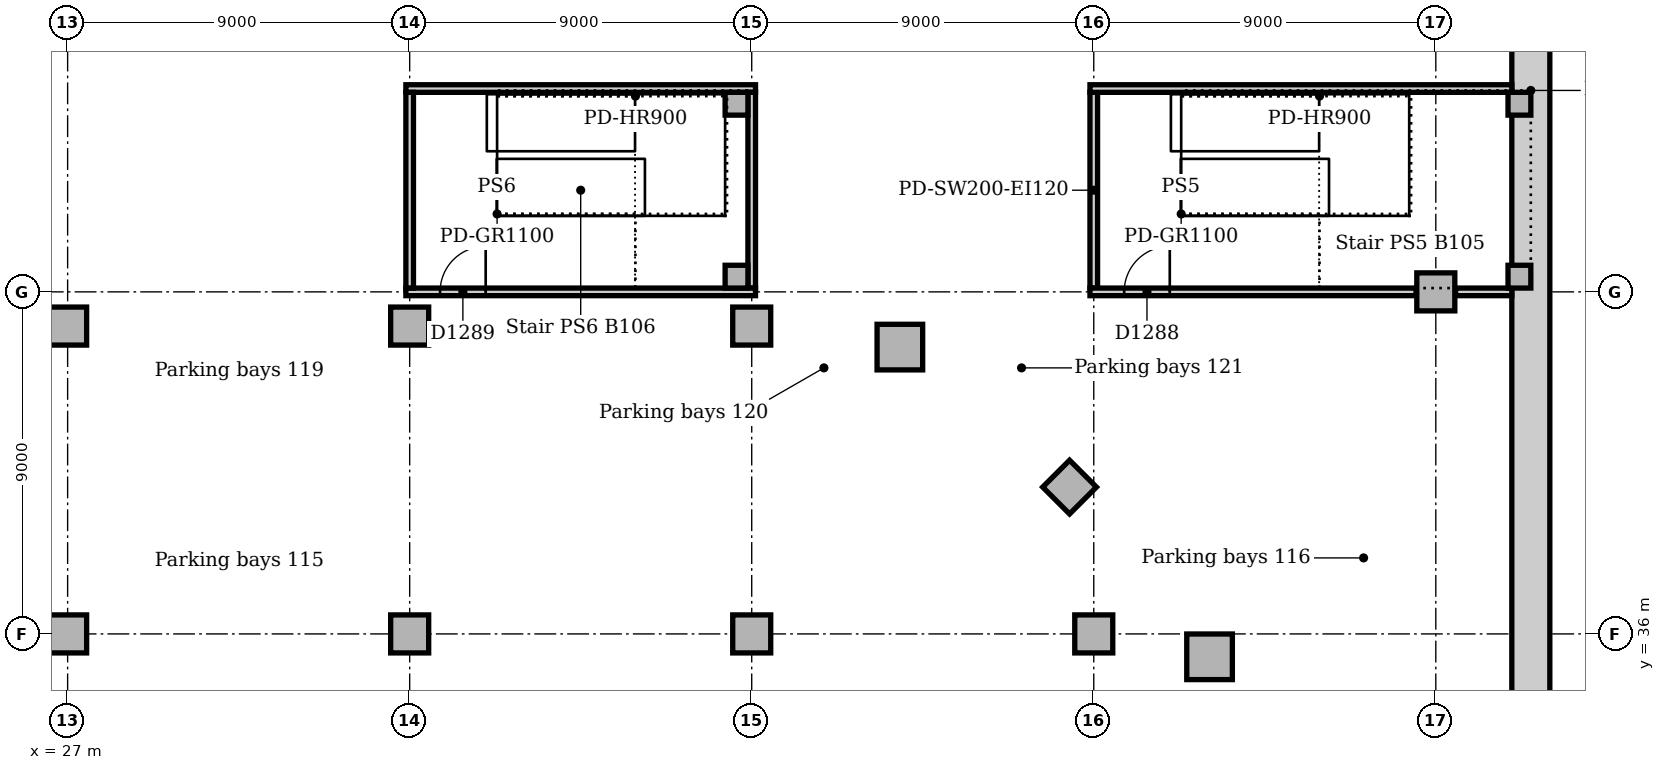
"""IFC4 building model, lengths in metres.
Left out: names, types, materials, properties, quantities, classifications, styles, units other than length and angle.
Written with IfcOpenShell. Run it as: python <this file> out.ifc"""

import sys

from ifc_helpers import new_model, si_unit, direction, frame, frame_2d, origin, origin_2d, place, context, subcontext, project, spatial, rectangle, extrude, element, fill, save


model = new_model("IFC4")
c1 = context("Model", 3, precision=1e-05, world=origin(), true_north=direction((0.0, 1.0)))
c2 = subcontext(c1, "Body", "Model", "MODEL_VIEW")
j1 = project(units=[si_unit("LENGTHUNIT", "METRE"), si_unit("PLANEANGLEUNIT", "RADIAN")], contexts=[c1])
p1 = place(None, origin())
s1 = spatial("IfcSite", under=j1, at=p1, CompositionType="ELEMENT")
p2 = place(p1, origin())
s2 = spatial("IfcBuilding", under=s1, at=p2, CompositionType="ELEMENT")
p3 = place(p2, frame((0.0, 0.0, -5.0)))
s3 = spatial("IfcBuildingStorey", under=s2, at=p3, CompositionType="ELEMENT", Elevation=-5.0)
for number, where, z_axis, x_axis in (
    (1, (57.047, 35.398, 0.0), (0.0, 0.0, 1.0), (1.0, 0.0, 0.0)),
    (2, (48.898, 43.547, 0.0), (0.0, 0.0, 1.0), (1.0, 0.0, 0.0)),
):
    element("IfcColumn", number, at=place(p3, frame(where, z_axis=z_axis, x_axis=x_axis)), inside=s3, PredefinedType="COLUMN", context=c2, shape_type="SweptSolid", body=[
        extrude(rectangle(XDim=1.2, YDim=1.2, at=origin_2d()), origin(), (0.0, 0.0, 1.0), 4.7),
    ])
for number, where, z_axis, x_axis in (
    (3, (53.364, 39.864, 0.0), (0.0, 0.0, 1.0), (0.707, 0.707, 0.0)),
    (4, (27.0, 44.1, 0.0), (0.0, 0.0, 1.0), (1.0, 0.0, 0.0)),
    (5, (36.0, 44.1, 0.0), (0.0, 0.0, 1.0), (1.0, 0.0, 0.0)),
    (6, (45.0, 44.1, 0.0), (0.0, 0.0, 1.0), (1.0, 0.0, 0.0)),
    (7, (27.0, 36.0, 0.0), (0.0, 0.0, 1.0), (1.0, 0.0, 0.0)),
    (8, (36.0, 36.0, 0.0), (0.0, 0.0, 1.0), (1.0, 0.0, 0.0)),
    (9, (45.0, 36.0, 0.0), (0.0, 0.0, 1.0), (1.0, 0.0, 0.0)),
    (10, (54.0, 36.0, 0.0), (0.0, 0.0, 1.0), (1.0, 0.0, 0.0)),
):
    element("IfcColumn", number, at=place(p3, frame(where, z_axis=z_axis, x_axis=x_axis)), inside=s3, PredefinedType="COLUMN", context=c2, shape_type="SweptSolid", body=[
        extrude(rectangle(XDim=1.0, YDim=1.0, at=origin_2d()), origin(), (0.0, 0.0, 1.0), 4.7),
    ])
p4 = place(p3, frame((65.5, 53.641, 0.0), z_axis=(0.0, 0.0, 1.0), x_axis=(0.0, -1.0, 0.0)))
e11 = element("IfcWall", 11, at=p4, inside=s3, PredefinedType="SOLIDWALL", context=c2, shape_type="SweptSolid", body=[
    extrude(rectangle(XDim=62.282, YDim=1.0, at=frame_2d((31.141, 0.0))), origin(), (0.0, 0.0, 1.0), 4.7),
])
p5 = place(p3, frame((63.0, 45.0, 0.0), z_axis=(0.0, 0.0, 1.0), x_axis=(1.0, 0.0, 0.0)))
e12 = element("IfcColumn", 12, at=p5, inside=s3, PredefinedType="COLUMN", context=c2, shape_type="SweptSolid", body=[
    extrude(rectangle(XDim=1.0, YDim=1.0, at=origin_2d()), origin(), (0.0, 0.0, 1.0), 4.7),
])
for number, where, z_axis, x_axis in (
    (13, (65.2, 49.95, 0.0), (0.0, 0.0, 1.0), (1.0, 0.0, 0.0)),
    (14, (65.2, 45.4, 0.0), (0.0, 0.0, 1.0), (1.0, 0.0, 0.0)),
    (15, (44.6, 49.95, 0.0), (0.0, 0.0, 1.0), (1.0, 0.0, 0.0)),
    (16, (44.6, 45.4, 0.0), (0.0, 0.0, 1.0), (1.0, 0.0, 0.0)),
):
    element("IfcColumn", number, at=place(p3, frame(where, z_axis=z_axis, x_axis=x_axis)), inside=s3, PredefinedType="COLUMN", context=c2, shape_type="SweptSolid", body=[
        extrude(rectangle(XDim=0.6, YDim=0.6, at=origin_2d()), origin(), (0.0, 0.0, 1.0), 5.0),
    ])
p6 = place(p3, frame((54.0, 45.1, 0.0), z_axis=(0.0, 0.0, 1.0), x_axis=(0.0, 1.0, 0.0)))
e17 = element("IfcWall", 17, at=p6, inside=s3, PredefinedType="SOLIDWALL", context=c2, shape_type="SweptSolid", body=[
    extrude(rectangle(XDim=5.15, YDim=0.2, at=frame_2d((2.575, 0.0))), origin(), (0.0, 0.0, 1.0), 4.7),
])
p7 = place(p3, frame((53.9, 50.35, 0.0), z_axis=(0.0, 0.0, 1.0), x_axis=(1.0, 0.0, 0.0)))
e18 = element("IfcWall", 18, at=p7, inside=s3, PredefinedType="SOLIDWALL", context=c2, shape_type="SweptSolid", body=[
    extrude(rectangle(XDim=11.1, YDim=0.2, at=frame_2d((5.55, 0.0))), origin(), (0.0, 0.0, 1.0), 4.7),
])
p8 = place(p3, frame((53.9, 45.0, 0.0), z_axis=(0.0, 0.0, 1.0), x_axis=(1.0, 0.0, 0.0)))
e19 = element("IfcWall", 19, at=p8, inside=s3, PredefinedType="SOLIDWALL", context=c2, shape_type="SweptSolid", body=[
    extrude(rectangle(XDim=8.58, YDim=0.2, at=frame_2d((4.29, 0.0))), origin(), (0.0, 0.0, 1.0), 4.7),
])
p9 = place(p8, frame((0.9, 0.0, 0.0)))
e20 = element("IfcOpeningElement", 20, at=p9, cuts=e19, PredefinedType="OPENING", context=c2, shape_type="SweptSolid", body=[
    extrude(rectangle(XDim=1.2, YDim=2.1, at=frame_2d((0.6, 1.05))), frame((0.0, 0.11, 0.0), z_axis=(0.0, -1.0, 0.0), x_axis=(1.0, 0.0, 0.0)), (0.0, 0.0, 1.0), 0.22),
])
p10 = place(p3, frame((63.52, 45.0, 0.0), z_axis=(0.0, 0.0, 1.0), x_axis=(1.0, 0.0, 0.0)))
e21 = element("IfcWall", 21, at=p10, inside=s3, PredefinedType="SOLIDWALL", context=c2, shape_type="SweptSolid", body=[
    extrude(rectangle(XDim=1.48, YDim=0.2, at=frame_2d((0.74, 0.0))), origin(), (0.0, 0.0, 1.0), 4.7),
])
p11 = place(p3, frame((35.9, 50.35, 0.0), z_axis=(0.0, 0.0, 1.0), x_axis=(1.0, 0.0, 0.0)))
e22 = element("IfcWall", 22, at=p11, inside=s3, PredefinedType="SOLIDWALL", context=c2, shape_type="SweptSolid", body=[
    extrude(rectangle(XDim=9.2, YDim=0.2, at=frame_2d((4.6, 0.0))), origin(), (0.0, 0.0, 1.0), 4.7),
])
p12 = place(p3, frame((45.0, 45.1, 0.0), z_axis=(0.0, 0.0, 1.0), x_axis=(0.0, 1.0, 0.0)))
e23 = element("IfcWall", 23, at=p12, inside=s3, PredefinedType="SOLIDWALL", context=c2, shape_type="SweptSolid", body=[
    extrude(rectangle(XDim=5.15, YDim=0.2, at=frame_2d((2.575, 0.0))), origin(), (0.0, 0.0, 1.0), 4.7),
])
p13 = place(p3, frame((35.9, 45.0, 0.0), z_axis=(0.0, 0.0, 1.0), x_axis=(1.0, 0.0, 0.0)))
e24 = element("IfcWall", 24, at=p13, inside=s3, PredefinedType="SOLIDWALL", context=c2, shape_type="SweptSolid", body=[
    extrude(rectangle(XDim=9.2, YDim=0.2, at=frame_2d((4.6, 0.0))), origin(), (0.0, 0.0, 1.0), 4.7),
])
p14 = place(p13, frame((0.9, 0.0, 0.0)))
e25 = element("IfcOpeningElement", 25, at=p14, cuts=e24, PredefinedType="OPENING", context=c2, shape_type="SweptSolid", body=[
    extrude(rectangle(XDim=1.2, YDim=2.1, at=frame_2d((0.6, 1.05))), frame((0.0, 0.11, 0.0), z_axis=(0.0, -1.0, 0.0), x_axis=(1.0, 0.0, 0.0)), (0.0, 0.0, 1.0), 0.22),
])
p15 = place(p3, frame((36.0, 45.1, 0.0), z_axis=(0.0, 0.0, 1.0), x_axis=(0.0, 1.0, 0.0)))
e26 = element("IfcWall", 26, at=p15, inside=s3, PredefinedType="SOLIDWALL", context=c2, shape_type="SweptSolid", body=[
    extrude(rectangle(XDim=5.15, YDim=0.2, at=frame_2d((2.575, 0.0))), origin(), (0.0, 0.0, 1.0), 4.7),
])
p16 = place(p9, origin())
e27 = element("IfcDoor", 27, at=p16, inside=s3, OperationType="SINGLE_SWING_RIGHT", PredefinedType="DOOR", context=c2, shape_type="SweptSolid", body=[
    extrude(rectangle(XDim=1.2, YDim=2.1, at=frame_2d((0.6, 1.05))), frame((0.0, 0.025, 0.0), z_axis=(0.0, -1.0, 0.0), x_axis=(1.0, 0.0, 0.0)), (0.0, 0.0, 1.0), 0.05),
])
fill(e20, e27)
p17 = place(p14, origin())
e28 = element("IfcDoor", 28, at=p17, inside=s3, OperationType="SINGLE_SWING_RIGHT", PredefinedType="DOOR", context=c2, shape_type="SweptSolid", body=[
    extrude(rectangle(XDim=1.2, YDim=2.1, at=frame_2d((0.6, 1.05))), frame((0.0, 0.025, 0.0), z_axis=(0.0, -1.0, 0.0), x_axis=(1.0, 0.0, 0.0)), (0.0, 0.0, 1.0), 0.05),
])
fill(e25, e28)
save(model, sys.argv[1])
